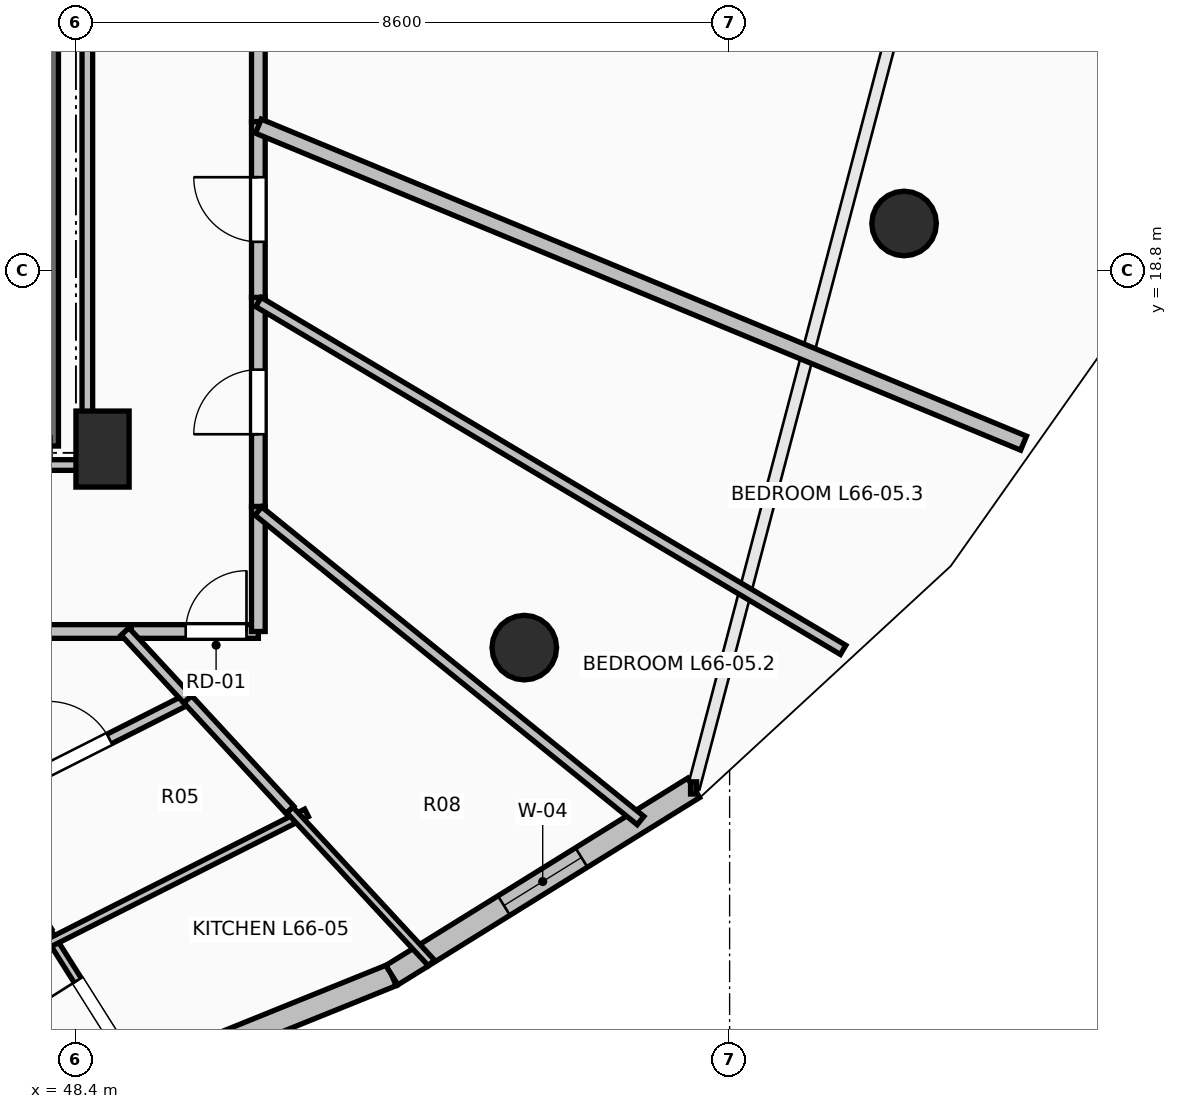
"""IFC4 building model, lengths in metres.
Left out: names, types, materials, properties, quantities, classifications, styles, units other than length and angle.
Written with IfcOpenShell. Run it as: python <this file> out.ifc"""

import sys

from ifc_helpers import new_model, si_unit, direction, frame, frame_2d, origin, origin_2d, place, context, subcontext, project, spatial, rectangle, circle, extrude, element, fill, save


model = new_model("IFC4")
c1 = context("Model", 3, precision=1e-05, world=origin(), true_north=direction((0.0, 1.0)))
c2 = subcontext(c1, "Body", "Model", "MODEL_VIEW")
j1 = project(units=[si_unit("LENGTHUNIT", "METRE"), si_unit("PLANEANGLEUNIT", "RADIAN")], contexts=[c1])
p1 = place(None, origin())
s1 = spatial("IfcSite", under=j1, at=p1, CompositionType="ELEMENT")
p2 = place(p1, origin())
s2 = spatial("IfcBuilding", under=s1, at=p2, CompositionType="ELEMENT")
p3 = place(p2, frame((0.0, 0.0, 244.9)))
s3 = spatial("IfcBuildingStorey", under=s2, at=p3, CompositionType="ELEMENT", Elevation=244.9)
for number, where, z_axis, x_axis in (
    (1, (54.299, 13.838, 0.0), (0.0, 0.0, 1.0), (0.707, -0.707, 0.0)),
    (2, (59.295, 19.418, 0.0), (0.0, 0.0, 1.0), (0.924, -0.383, 0.0)),
):
    element("IfcColumn", number, at=place(p3, frame(where, z_axis=z_axis, x_axis=x_axis)), inside=s3, PredefinedType="COLUMN", context=c2, shape_type="SweptSolid", body=[
        extrude(circle(Radius=0.425, at=origin_2d()), origin(), (0.0, 0.0, 1.0), 3.55),
    ])
p4 = place(p3, frame((48.75, 16.45, 0.0), z_axis=(0.0, 0.0, 1.0), x_axis=(1.0, 0.0, 0.0)))
e3 = element("IfcColumn", 3, at=p4, inside=s3, PredefinedType="PILASTER", context=c2, shape_type="SweptSolid", body=[
    extrude(rectangle(XDim=0.7, YDim=1.0, at=origin_2d()), origin(), (0.0, 0.0, 1.0), 3.55),
])
p5 = place(p3, frame((48.026, 7.698, 0.0), z_axis=(0.0, 0.0, 1.0), x_axis=(0.927147375511, 0.374696869594, 0.0)))
e4 = element("IfcWall", 4, at=p5, inside=s3, PredefinedType="STANDARD", context=c2, shape_type="SweptSolid", body=[
    extrude(rectangle(XDim=4.885, YDim=0.3, at=frame_2d((2.443, 0.0))), origin(), (0.0, 0.0, 1.0), 3.29),
])
p6 = place(p3, frame((52.556, 9.529, 0.0), z_axis=(0.0, 0.0, 1.0), x_axis=(0.849702323036, 0.527262707032, 0.0)))
e5 = element("IfcWall", 5, at=p6, inside=s3, PredefinedType="STANDARD", context=c2, shape_type="SweptSolid", body=[
    extrude(rectangle(XDim=4.672, YDim=0.3, at=frame_2d((2.336, 0.0))), origin(), (0.0, 0.0, 1.0), 3.29),
])
p7 = place(p6, frame((1.736, 0.0, 0.85)))
e6 = element("IfcOpeningElement", 6, at=p7, cuts=e5, PredefinedType="OPENING", context=c2, shape_type="SweptSolid", body=[
    extrude(rectangle(XDim=1.2, YDim=1.95, at=frame_2d((0.6, 0.975))), frame((0.0, 0.165, 0.0), z_axis=(0.0, -1.0, 0.0), x_axis=(1.0, 0.0, 0.0)), (0.0, 0.0, 1.0), 0.33),
])
p8 = place(p3, frame((48.06, 23.91, 0.0), z_axis=(0.0, 0.0, 1.0), x_axis=(0.0, -1.0, 0.0)))
e7 = element("IfcWall", 7, at=p8, inside=s3, PredefinedType="SOLIDWALL", context=c2, shape_type="SweptSolid", body=[
    extrude(rectangle(XDim=7.42, YDim=0.22, at=frame_2d((3.71, 0.0))), origin(), (0.0, 0.0, 1.0), 3.29),
])
p9 = place(p3, frame((45.237, 14.05, 0.0), z_axis=(0.0, 0.0, 1.0), x_axis=(1.0, 0.0, 0.0)))
e8 = element("IfcWall", 8, at=p9, inside=s3, PredefinedType="PARTITIONING", context=c2, shape_type="SweptSolid", body=[
    extrude(rectangle(XDim=3.891, YDim=0.18, at=frame_2d((1.945, 0.0))), origin(), (0.0, 0.0, 1.0), 2.482),
])
p10 = place(p9, frame((1.446, 0.0, 0.0)))
e9 = element("IfcOpeningElement", 9, at=p10, cuts=e8, PredefinedType="OPENING", context=c2, shape_type="SweptSolid", body=[
    extrude(rectangle(XDim=1.0, YDim=2.15, at=frame_2d((0.5, 1.075))), frame((0.0, 0.105, 0.0), z_axis=(0.0, -1.0, 0.0), x_axis=(1.0, 0.0, 0.0)), (0.0, 0.0, 1.0), 0.21),
])
p11 = place(p3, frame((49.128, 14.05, 0.0), z_axis=(0.0, 0.0, 1.0), x_axis=(1.0, 0.0, 0.0)))
e10 = element("IfcWall", 10, at=p11, inside=s3, PredefinedType="PARTITIONING", context=c2, shape_type="SweptSolid", body=[
    extrude(rectangle(XDim=1.672, YDim=0.18, at=frame_2d((0.836, 0.0))), origin(), (0.0, 0.0, 1.0), 2.972),
])
p12 = place(p11, frame((0.716, 0.0, 0.0)))
e11 = element("IfcOpeningElement", 11, at=p12, cuts=e10, PredefinedType="OPENING", context=c2, shape_type="SweptSolid", body=[
    extrude(rectangle(XDim=0.8, YDim=2.05, at=frame_2d((0.4, 1.025))), frame((0.0, 0.105, 0.0), z_axis=(0.0, -1.0, 0.0), x_axis=(1.0, 0.0, 0.0)), (0.0, 0.0, 1.0), 0.21),
])
p13 = place(p3, frame((50.8, 14.05, 0.0), z_axis=(0.0, 0.0, 1.0), x_axis=(0.0, 1.0, 0.0)))
e12 = element("IfcWall", 12, at=p13, inside=s3, PredefinedType="PARTITIONING", context=c2, shape_type="SweptSolid", body=[
    extrude(rectangle(XDim=1.645, YDim=0.18, at=frame_2d((0.823, 0.0))), origin(), (0.0, 0.0, 1.0), 2.482),
])
p14 = place(p3, frame((50.8, 15.695, 0.0), z_axis=(0.0, 0.0, 1.0), x_axis=(0.0, 1.0, 0.0)))
e13 = element("IfcWall", 13, at=p14, inside=s3, PredefinedType="PARTITIONING", context=c2, shape_type="SweptSolid", body=[
    extrude(rectangle(XDim=2.75, YDim=0.18, at=frame_2d((1.375, 0.0))), origin(), (0.0, 0.0, 1.0), 2.482),
])
p15 = place(p14, frame((0.95, 0.0, 0.0)))
e14 = element("IfcOpeningElement", 14, at=p15, cuts=e13, PredefinedType="OPENING", context=c2, shape_type="SweptSolid", body=[
    extrude(rectangle(XDim=0.85, YDim=2.1, at=frame_2d((0.425, 1.05))), frame((0.0, 0.105, 0.0), z_axis=(0.0, -1.0, 0.0), x_axis=(1.0, 0.0, 0.0)), (0.0, 0.0, 1.0), 0.21),
])
p16 = place(p3, frame((50.8, 18.445, 0.0), z_axis=(0.0, 0.0, 1.0), x_axis=(0.0, 1.0, 0.0)))
e15 = element("IfcWall", 15, at=p16, inside=s3, PredefinedType="PARTITIONING", context=c2, shape_type="SweptSolid", body=[
    extrude(rectangle(XDim=2.313, YDim=0.18, at=frame_2d((1.156, 0.0))), origin(), (0.0, 0.0, 1.0), 3.022),
])
p17 = place(p16, frame((0.731, 0.0, 0.0)))
e16 = element("IfcOpeningElement", 16, at=p17, cuts=e15, PredefinedType="OPENING", context=c2, shape_type="SweptSolid", body=[
    extrude(rectangle(XDim=0.85, YDim=2.1, at=frame_2d((0.425, 1.05))), frame((0.0, 0.105, 0.0), z_axis=(0.0, -1.0, 0.0), x_axis=(1.0, 0.0, 0.0)), (0.0, 0.0, 1.0), 0.21),
])
p18 = place(p3, frame((50.8, 20.758, 0.0), z_axis=(0.0, 0.0, 1.0), x_axis=(0.0, 1.0, 0.0)))
e17 = element("IfcWall", 17, at=p18, inside=s3, PredefinedType="PARTITIONING", context=c2, shape_type="SweptSolid", body=[
    extrude(rectangle(XDim=10.609, YDim=0.18, at=frame_2d((5.304, 0.0))), origin(), (0.0, 0.0, 1.0), 2.482),
])
p19 = place(p18, frame((4.804, 0.0, 0.0)))
e18 = element("IfcOpeningElement", 18, at=p19, cuts=e17, PredefinedType="OPENING", context=c2, shape_type="SweptSolid", body=[
    extrude(rectangle(XDim=1.0, YDim=2.15, at=frame_2d((0.5, 1.075))), frame((0.0, 0.105, 0.0), z_axis=(0.0, -1.0, 0.0), x_axis=(1.0, 0.0, 0.0)), (0.0, 0.0, 1.0), 0.21),
])
p20 = place(p3, frame((49.303, 8.067, 0.0), z_axis=(0.0, 0.0, 1.0), x_axis=(-0.53356042882, 0.845761945702, 0.0)))
e19 = element("IfcWall", 19, at=p20, inside=s3, PredefinedType="PARTITIONING", context=c2, shape_type="SweptSolid", body=[
    extrude(rectangle(XDim=2.4, YDim=0.11, at=frame_2d((1.2, 0.0))), origin(), (0.0, 0.0, 1.0), 3.29),
])
p21 = place(p20, frame((0.75, 0.0, 0.0)))
e20 = element("IfcOpeningElement", 20, at=p21, cuts=e19, PredefinedType="OPENING", context=c2, shape_type="SweptSolid", body=[
    extrude(rectangle(XDim=0.9, YDim=2.1, at=frame_2d((0.45, 1.05))), frame((0.0, 0.07, 0.0), z_axis=(0.0, -1.0, 0.0), x_axis=(1.0, 0.0, 0.0)), (0.0, 0.0, 1.0), 0.14),
])
p22 = place(p3, frame((47.006, 11.71, 0.0), z_axis=(0.0, 0.0, 1.0), x_axis=(0.892487089344, 0.451072937955, 0.0)))
e21 = element("IfcWall", 21, at=p22, inside=s3, PredefinedType="PARTITIONING", context=c2, shape_type="SweptSolid", body=[
    extrude(rectangle(XDim=3.21, YDim=0.14, at=frame_2d((1.605, 0.0))), origin(), (0.0, 0.0, 1.0), 2.482),
])
p23 = place(p22, frame((1.155, 0.0, 0.0)))
e22 = element("IfcOpeningElement", 22, at=p23, cuts=e21, PredefinedType="OPENING", context=c2, shape_type="SweptSolid", body=[
    extrude(rectangle(XDim=0.9, YDim=2.1, at=frame_2d((0.45, 1.05))), frame((0.0, 0.085, 0.0), z_axis=(0.0, -1.0, 0.0), x_axis=(1.0, 0.0, 0.0)), (0.0, 0.0, 1.0), 0.17),
])
p24 = place(p3, frame((49.871, 13.158, 0.0), z_axis=(0.0, 0.0, 1.0), x_axis=(-0.679047394912, 0.734094432251, 0.0)))
e23 = element("IfcWall", 23, at=p24, inside=s3, PredefinedType="PARTITIONING", context=c2, shape_type="SweptSolid", body=[
    extrude(rectangle(XDim=1.215, YDim=0.14, at=frame_2d((0.608, 0.0))), origin(), (0.0, 0.0, 1.0), 2.972),
])
p25 = place(p3, frame((51.434, 11.664, 0.0), z_axis=(0.0, 0.0, 1.0), x_axis=(-0.892543730476, -0.450960851059, 0.0)))
e24 = element("IfcWall", 24, at=p25, inside=s3, PredefinedType="PARTITIONING", context=c2, shape_type="SweptSolid", body=[
    extrude(rectangle(XDim=3.879, YDim=0.11, at=frame_2d((1.939, 0.0))), origin(), (0.0, 0.0, 1.0), 3.29),
])
p26 = place(p3, frame((53.076, 9.69, 0.0), z_axis=(0.0, 0.0, 1.0), x_axis=(-0.678974823397, 0.734161555241, 0.0)))
e25 = element("IfcWall", 25, at=p26, inside=s3, PredefinedType="PARTITIONING", context=c2, shape_type="SweptSolid", body=[
    extrude(rectangle(XDim=2.743, YDim=0.11, at=frame_2d((1.372, 0.0))), origin(), (0.0, 0.0, 1.0), 3.29),
])
p27 = place(p3, frame((51.215, 11.704, 0.0), z_axis=(0.0, 0.0, 1.0), x_axis=(-0.678746140468, 0.734372982073, 0.0)))
e26 = element("IfcWall", 26, at=p27, inside=s3, PredefinedType="PARTITIONING", context=c2, shape_type="SweptSolid", body=[
    extrude(rectangle(XDim=1.979, YDim=0.14, at=frame_2d((0.99, 0.0))), origin(), (0.0, 0.0, 1.0), 2.874),
])
p28 = place(p3, frame((55.828, 11.563, 0.0), z_axis=(0.0, 0.0, 1.0), x_axis=(-0.777103372697, 0.62937298015, 0.0)))
e27 = element("IfcWall", 27, at=p28, inside=s3, PredefinedType="PARTITIONING", context=c2, shape_type="SweptSolid", body=[
    extrude(rectangle(XDim=6.47, YDim=0.14, at=frame_2d((3.235, 0.0))), origin(), (0.0, 0.0, 1.0), 2.482),
])
p29 = place(p3, frame((58.493, 13.808, 0.0), z_axis=(0.0, 0.0, 1.0), x_axis=(-0.859400180079, 0.511303560011, 0.0)))
e28 = element("IfcWall", 28, at=p29, inside=s3, PredefinedType="PARTITIONING", context=c2, shape_type="SweptSolid", body=[
    extrude(rectangle(XDim=8.951, YDim=0.14, at=frame_2d((4.476, 0.0))), origin(), (0.0, 0.0, 1.0), 2.874),
])
p30 = place(p3, frame((60.867, 16.528, 0.0), z_axis=(0.0, 0.0, 1.0), x_axis=(-0.923877013663, 0.382689513347, 0.0)))
e29 = element("IfcWall", 29, at=p30, inside=s3, PredefinedType="PARTITIONING", context=c2, shape_type="SweptSolid", body=[
    extrude(rectangle(XDim=10.896, YDim=0.2, at=frame_2d((5.448, 0.0))), origin(), (0.0, 0.0, 1.0), 2.874),
])
p31 = place(p3, frame((44.805, 16.24, 0.0), z_axis=(0.0, 0.0, 1.0), x_axis=(1.0, 0.0, 0.0)))
e30 = element("IfcWall", 30, at=p31, inside=s3, PredefinedType="PARTITIONING", context=c2, shape_type="SweptSolid", body=[
    extrude(rectangle(XDim=3.745, YDim=0.14, at=frame_2d((1.873, 0.0))), origin(), (0.0, 0.0, 1.0), 2.482),
])
p32 = place(p3, frame((48.55, 16.24, 0.0), z_axis=(0.0, 0.0, 1.0), x_axis=(0.0, 1.0, 0.0)))
e31 = element("IfcWall", 31, at=p32, inside=s3, PredefinedType="PARTITIONING", context=c2, shape_type="SweptSolid", body=[
    extrude(rectangle(XDim=7.514, YDim=0.14, at=frame_2d((3.757, 0.0))), origin(), (0.0, 0.0, 1.0), 2.482),
])
p33 = place(p7, origin())
e32 = element("IfcWindow", 32, at=p33, inside=s3, PartitioningType="SINGLE_PANEL", PredefinedType="WINDOW", context=c2, shape_type="SweptSolid", body=[
    extrude(rectangle(XDim=1.2, YDim=1.95, at=frame_2d((0.6, 0.975))), frame((0.0, 0.03, 0.0), z_axis=(0.0, -1.0, 0.0), x_axis=(1.0, 0.0, 0.0)), (0.0, 0.0, 1.0), 0.06),
])
fill(e6, e32)
p34 = place(p21, origin())
e33 = element("IfcDoor", 33, at=p34, inside=s3, OperationType="SINGLE_SWING_RIGHT", PredefinedType="DOOR", context=c2, shape_type="SweptSolid", body=[
    extrude(rectangle(XDim=0.9, YDim=2.1, at=frame_2d((0.45, 1.05))), frame((0.0, 0.025, 0.0), z_axis=(0.0, -1.0, 0.0), x_axis=(1.0, 0.0, 0.0)), (0.0, 0.0, 1.0), 0.05),
])
fill(e20, e33)
p35 = place(p23, origin())
e34 = element("IfcDoor", 34, at=p35, inside=s3, OperationType="SINGLE_SWING_LEFT", PredefinedType="DOOR", context=c2, shape_type="SweptSolid", body=[
    extrude(rectangle(XDim=0.9, YDim=2.1, at=frame_2d((0.45, 1.05))), frame((0.0, 0.025, 0.0), z_axis=(0.0, -1.0, 0.0), x_axis=(1.0, 0.0, 0.0)), (0.0, 0.0, 1.0), 0.05),
])
fill(e22, e34)
p36 = place(p12, origin())
e35 = element("IfcDoor", 35, at=p36, inside=s3, OperationType="SINGLE_SWING_RIGHT", PredefinedType="DOOR", context=c2, shape_type="SweptSolid", body=[
    extrude(rectangle(XDim=0.8, YDim=2.05, at=frame_2d((0.4, 1.025))), frame((0.0, 0.025, 0.0), z_axis=(0.0, -1.0, 0.0), x_axis=(1.0, 0.0, 0.0)), (0.0, 0.0, 1.0), 0.05),
])
fill(e11, e35)
p37 = place(p15, origin())
e36 = element("IfcDoor", 36, at=p37, inside=s3, OperationType="SINGLE_SWING_LEFT", PredefinedType="DOOR", context=c2, shape_type="SweptSolid", body=[
    extrude(rectangle(XDim=0.85, YDim=2.1, at=frame_2d((0.425, 1.05))), frame((0.0, 0.025, 0.0), z_axis=(0.0, -1.0, 0.0), x_axis=(1.0, 0.0, 0.0)), (0.0, 0.0, 1.0), 0.05),
])
fill(e14, e36)
p38 = place(p17, origin())
e37 = element("IfcDoor", 37, at=p38, inside=s3, OperationType="SINGLE_SWING_RIGHT", PredefinedType="DOOR", context=c2, shape_type="SweptSolid", body=[
    extrude(rectangle(XDim=0.85, YDim=2.1, at=frame_2d((0.425, 1.05))), frame((0.0, 0.025, 0.0), z_axis=(0.0, -1.0, 0.0), x_axis=(1.0, 0.0, 0.0)), (0.0, 0.0, 1.0), 0.05),
])
fill(e16, e37)
save(model, sys.argv[1])
